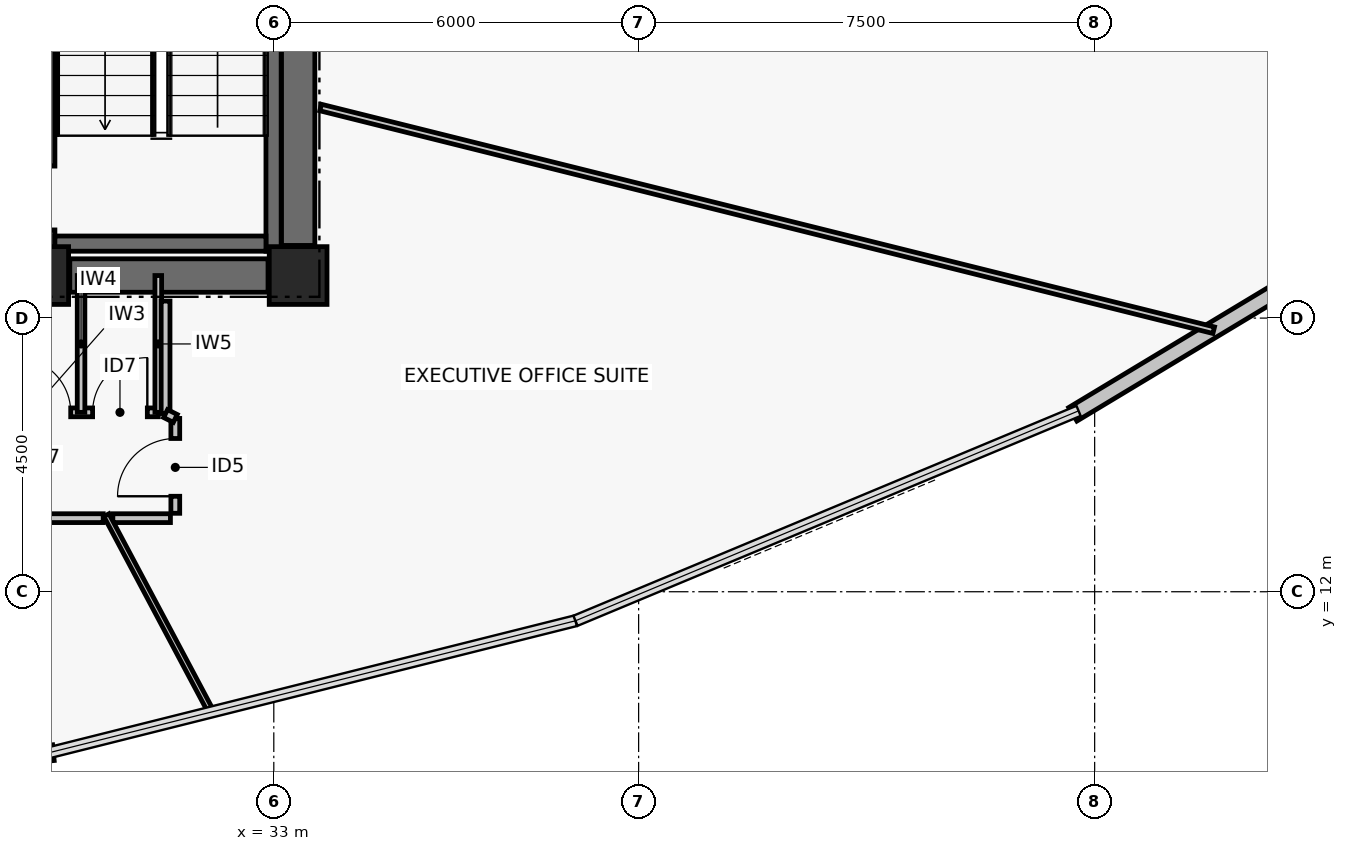
"""IFC4 building model, lengths in metres.
Left out: names, types, materials, properties, quantities, classifications, styles, units other than length and angle.
Written with IfcOpenShell. Run it as: python <this file> out.ifc"""

import sys

from ifc_helpers import new_model, si_unit, direction, frame, frame_2d, origin, origin_2d, place, context, subcontext, project, spatial, rectangle, extrude, element, fill, save


model = new_model("IFC4")
c1 = context("Model", 3, precision=1e-05, world=origin(), true_north=direction((0.0, 1.0)))
c2 = subcontext(c1, "Body", "Model", "MODEL_VIEW")
j1 = project(units=[si_unit("LENGTHUNIT", "METRE"), si_unit("PLANEANGLEUNIT", "RADIAN")], contexts=[c1])
p1 = place(None, origin())
s1 = spatial("IfcSite", under=j1, at=p1, CompositionType="ELEMENT")
p2 = place(p1, origin())
s2 = spatial("IfcBuilding", under=s1, at=p2, CompositionType="ELEMENT")
p3 = place(p2, frame((0.0, 0.0, 165.48)))
s3 = spatial("IfcBuildingStorey", under=s2, at=p3, CompositionType="ELEMENT", Elevation=165.48)
for number, where, z_axis, x_axis in (
    (1, (29.15, 17.2, 0.0), (0.0, 0.0, 1.0), (1.0, 0.0, 0.0)),
    (2, (33.4, 17.2, 0.0), (0.0, 0.0, 1.0), (1.0, 0.0, 0.0)),
):
    element("IfcColumn", number, at=place(p3, frame(where, z_axis=z_axis, x_axis=x_axis)), inside=s3, PredefinedType="COLUMN", context=c2, shape_type="SweptSolid", body=[
        extrude(rectangle(XDim=0.95, YDim=0.95, at=origin_2d()), origin(), (0.0, 0.0, 1.0), 3.72),
    ])
p4 = place(p3, frame((29.645, 17.2, 0.0), z_axis=(0.0, 0.0, 1.0), x_axis=(1.0, 0.0, 0.0)))
e3 = element("IfcWall", 3, at=p4, inside=s3, PredefinedType="SHEAR", context=c2, shape_type="SweptSolid", body=[
    extrude(rectangle(XDim=3.26, YDim=0.55, at=frame_2d((1.63, 0.0))), origin(), (0.0, 0.0, 1.0), 3.5),
])
p5 = place(p3, frame((33.4, 17.695, 0.0), z_axis=(0.0, 0.0, 1.0), x_axis=(0.0, 1.0, 0.0)))
e4 = element("IfcWall", 4, at=p5, inside=s3, PredefinedType="SHEAR", context=c2, shape_type="SweptSolid", body=[
    extrude(rectangle(XDim=8.61, YDim=0.55, at=frame_2d((4.305, 0.0))), origin(), (0.0, 0.0, 1.0), 3.5),
])
p6 = place(p3, frame((29.275, 17.6, 0.0), z_axis=(0.0, 0.0, 1.0), x_axis=(0.0, 1.0, 0.0)))
e5 = element("IfcWall", 5, at=p6, inside=s3, PredefinedType="SHEAR", context=c2, shape_type="SweptSolid", body=[
    extrude(rectangle(XDim=8.8, YDim=0.25, at=frame_2d((4.4, 0.0))), origin(), (0.0, 0.0, 1.0), 3.5),
])
p7 = place(p6, frame((0.35, 0.0, 0.0)))
e6 = element("IfcOpeningElement", 6, at=p7, cuts=e5, PredefinedType="OPENING", context=c2, shape_type="SweptSolid", body=[
    extrude(rectangle(XDim=1.05, YDim=2.08, at=frame_2d((0.525, 1.04))), frame((0.0, 0.135, 0.0), z_axis=(0.0, -1.0, 0.0), x_axis=(1.0, 0.0, 0.0)), (0.0, 0.0, 1.0), 0.27),
])
p8 = place(p3, frame((32.996, 17.6, 0.0), z_axis=(0.0, 0.0, 1.0), x_axis=(0.0, 1.0, 0.0)))
e7 = element("IfcWall", 7, at=p8, inside=s3, PredefinedType="SHEAR", context=c2, shape_type="SweptSolid", body=[
    extrude(rectangle(XDim=8.8, YDim=0.25, at=frame_2d((4.4, 0.0))), origin(), (0.0, 0.0, 1.0), 3.5),
])
p9 = place(p3, frame((29.4, 17.725, 0.0), z_axis=(0.0, 0.0, 1.0), x_axis=(1.0, 0.0, 0.0)))
e8 = element("IfcWall", 8, at=p9, inside=s3, PredefinedType="SHEAR", context=c2, shape_type="SweptSolid", body=[
    extrude(rectangle(XDim=3.471, YDim=0.25, at=frame_2d((1.736, 0.0))), origin(), (0.0, 0.0, 1.0), 3.5),
])
p10 = place(p3, frame((29.375, 9.354, 0.0), z_axis=(0.0, 0.0, 1.0), x_axis=(-0.9950896707, -0.098977508888, 0.0)))
e9 = element("IfcWall", 9, at=p10, inside=s3, PredefinedType="PARTITIONING", context=c2, shape_type="SweptSolid", body=[
    extrude(rectangle(XDim=9.28, YDim=0.26, at=frame_2d((4.64, 0.0))), origin(), (0.0, 0.0, 1.0), 3.5),
])
p11 = place(p3, frame((54.091, 19.703, 0.0), z_axis=(0.0, 0.0, 1.0), x_axis=(-0.856788694159, -0.515667658053, 0.0)))
e10 = element("IfcWall", 10, at=p11, inside=s3, PredefinedType="PARTITIONING", context=c2, shape_type="SweptSolid", body=[
    extrude(rectangle(XDim=9.279, YDim=0.26, at=frame_2d((4.64, 0.0))), origin(), (0.0, 0.0, 1.0), 3.5),
])
p12 = place(p3, frame((26.88, 14.95, 0.0), z_axis=(0.0, 0.0, 1.0), x_axis=(1.0, 0.0, 0.0)))
e11 = element("IfcWall", 11, at=p12, inside=s3, PredefinedType="PARTITIONING", context=c2, shape_type="SweptSolid", body=[
    extrude(rectangle(XDim=4.22, YDim=0.145, at=frame_2d((2.11, 0.0))), origin(), (0.0, 0.0, 1.0), 2.93),
])
p13 = place(p12, frame((0.39, 0.0, 0.0)))
e12 = element("IfcOpeningElement", 12, at=p13, cuts=e11, PredefinedType="OPENING", context=c2, shape_type="SweptSolid", body=[
    extrude(rectangle(XDim=0.92, YDim=2.05, at=frame_2d((0.46, 1.025))), frame((0.0, 0.083, 0.0), z_axis=(0.0, -1.0, 0.0), x_axis=(1.0, 0.0, 0.0)), (0.0, 0.0, 1.0), 0.165),
])
p14 = place(p12, frame((1.88, 0.0, 0.0)))
e13 = element("IfcOpeningElement", 13, at=p14, cuts=e11, PredefinedType="OPENING", context=c2, shape_type="SweptSolid", body=[
    extrude(rectangle(XDim=0.9, YDim=2.02, at=frame_2d((0.45, 1.01))), frame((0.0, 0.083, 0.0), z_axis=(0.0, -1.0, 0.0), x_axis=(1.0, 0.0, 0.0)), (0.0, 0.0, 1.0), 0.165),
])
p15 = place(p12, frame((3.14, 0.0, 0.0)))
e14 = element("IfcOpeningElement", 14, at=p15, cuts=e11, PredefinedType="OPENING", context=c2, shape_type="SweptSolid", body=[
    extrude(rectangle(XDim=0.9, YDim=2.02, at=frame_2d((0.45, 1.01))), frame((0.0, 0.083, 0.0), z_axis=(0.0, -1.0, 0.0), x_axis=(1.0, 0.0, 0.0)), (0.0, 0.0, 1.0), 0.165),
])
p16 = place(p3, frame((29.83, 14.95, 0.0), z_axis=(0.0, 0.0, 1.0), x_axis=(0.0, 1.0, 0.0)))
e15 = element("IfcWall", 15, at=p16, inside=s3, PredefinedType="PARTITIONING", context=c2, shape_type="SweptSolid", body=[
    extrude(rectangle(XDim=2.25, YDim=0.125, at=frame_2d((1.125, 0.0))), origin(), (0.0, 0.0, 1.0), 2.63),
])
p17 = place(p3, frame((31.1, 14.95, 0.0), z_axis=(0.0, 0.0, 1.0), x_axis=(0.0, 1.0, 0.0)))
e16 = element("IfcWall", 16, at=p17, inside=s3, PredefinedType="PARTITIONING", context=c2, shape_type="SweptSolid", body=[
    extrude(rectangle(XDim=2.25, YDim=0.11, at=frame_2d((1.125, 0.0))), origin(), (0.0, 0.0, 1.0), 2.63),
])
p18 = place(p3, frame((21.006, 13.21, 0.0), z_axis=(0.0, 0.0, 1.0), x_axis=(1.0, 0.0, 0.0)))
e17 = element("IfcWall", 17, at=p18, inside=s3, PredefinedType="PARTITIONING", context=c2, shape_type="SweptSolid", body=[
    extrude(rectangle(XDim=9.189, YDim=0.145, at=frame_2d((4.594, 0.0))), origin(), (0.0, 0.0, 1.0), 2.73),
])
p19 = place(p18, frame((5.098, 0.0, 0.0)))
e18 = element("IfcOpeningElement", 18, at=p19, cuts=e17, PredefinedType="OPENING", context=c2, shape_type="SweptSolid", body=[
    extrude(rectangle(XDim=0.92, YDim=2.05, at=frame_2d((0.46, 1.025))), frame((0.0, 0.083, 0.0), z_axis=(0.0, -1.0, 0.0), x_axis=(1.0, 0.0, 0.0)), (0.0, 0.0, 1.0), 0.165),
])
p20 = place(p3, frame((30.353, 13.21, 0.0), z_axis=(0.0, 0.0, 1.0), x_axis=(1.0, 0.0, 0.0)))
e19 = element("IfcWall", 19, at=p20, inside=s3, PredefinedType="PARTITIONING", context=c2, shape_type="SweptSolid", body=[
    extrude(rectangle(XDim=0.947, YDim=0.145, at=frame_2d((0.474, 0.0))), origin(), (0.0, 0.0, 1.0), 3.5),
])
p21 = place(p3, frame((31.38, 13.29, 0.0), z_axis=(0.0, 0.0, 1.0), x_axis=(0.0, 1.0, 0.0)))
e20 = element("IfcWall", 20, at=p21, inside=s3, PredefinedType="PARTITIONING", context=c2, shape_type="SweptSolid", body=[
    extrude(rectangle(XDim=1.56, YDim=0.145, at=frame_2d((0.78, 0.0))), origin(), (0.0, 0.0, 1.0), 3.5),
])
p22 = place(p21, frame((0.28, 0.0, 0.0)))
e21 = element("IfcOpeningElement", 21, at=p22, cuts=e20, PredefinedType="OPENING", context=c2, shape_type="SweptSolid", body=[
    extrude(rectangle(XDim=0.95, YDim=2.06, at=frame_2d((0.475, 1.03))), frame((0.0, 0.083, 0.0), z_axis=(0.0, -1.0, 0.0), x_axis=(1.0, 0.0, 0.0)), (0.0, 0.0, 1.0), 0.165),
])
p23 = place(p3, frame((31.22, 14.93, 0.0), z_axis=(0.0, 0.0, 1.0), x_axis=(0.0, 1.0, 0.0)))
e22 = element("IfcWall", 22, at=p23, inside=s3, PredefinedType="PARTITIONING", context=c2, shape_type="SweptSolid", body=[
    extrude(rectangle(XDim=1.85, YDim=0.145, at=frame_2d((0.925, 0.0))), origin(), (0.0, 0.0, 1.0), 2.63),
])
p24 = place(p3, frame((30.247, 13.26, 0.0), z_axis=(0.0, 0.0, 1.0), x_axis=(0.469475406562, -0.882945549076, 0.0)))
e23 = element("IfcWall", 23, at=p24, inside=s3, PredefinedType="PARTITIONING", context=c2, shape_type="SweptSolid", body=[
    extrude(rectangle(XDim=3.679, YDim=0.095, at=frame_2d((1.84, 0.0))), origin(), (0.0, 0.0, 1.0), 3.5),
])
p25 = place(p3, frame((33.77, 19.963, 0.0), z_axis=(0.0, 0.0, 1.0), x_axis=(0.970295996232, -0.241920812863, 0.0)))
e24 = element("IfcWall", 24, at=p25, inside=s3, PredefinedType="PARTITIONING", context=c2, shape_type="SweptSolid", body=[
    extrude(rectangle(XDim=15.138, YDim=0.11, at=frame_2d((7.569, 0.0))), origin(), (0.0, 0.0, 1.0), 2.63),
])
p26 = place(p3, frame((31.38, 14.85, 0.0), z_axis=(0.0, 0.0, 1.0), x_axis=(-0.89470021502, 0.446667130247, 0.0)))
e25 = element("IfcWall", 25, at=p26, inside=s3, PredefinedType="PARTITIONING", context=c2, shape_type="SweptSolid", body=[
    extrude(rectangle(XDim=0.179, YDim=0.145, at=frame_2d((0.089, 0.0))), origin(), (0.0, 0.0, 1.0), 3.5),
])
p27 = place(p14, origin())
e26 = element("IfcDoor", 26, at=p27, inside=s3, OperationType="SINGLE_SWING_LEFT", PredefinedType="DOOR", context=c2, shape_type="SweptSolid", body=[
    extrude(rectangle(XDim=0.9, YDim=2.02, at=frame_2d((0.45, 1.01))), frame((0.0, 0.025, 0.0), z_axis=(0.0, -1.0, 0.0), x_axis=(1.0, 0.0, 0.0)), (0.0, 0.0, 1.0), 0.05),
])
fill(e13, e26)
p28 = place(p15, origin())
e27 = element("IfcDoor", 27, at=p28, inside=s3, OperationType="SINGLE_SWING_RIGHT", PredefinedType="DOOR", context=c2, shape_type="SweptSolid", body=[
    extrude(rectangle(XDim=0.9, YDim=2.02, at=frame_2d((0.45, 1.01))), frame((0.0, 0.025, 0.0), z_axis=(0.0, -1.0, 0.0), x_axis=(1.0, 0.0, 0.0)), (0.0, 0.0, 1.0), 0.05),
])
fill(e14, e27)
p29 = place(p22, origin())
e28 = element("IfcDoor", 28, at=p29, inside=s3, OperationType="SINGLE_SWING_LEFT", PredefinedType="DOOR", context=c2, shape_type="SweptSolid", body=[
    extrude(rectangle(XDim=0.95, YDim=2.06, at=frame_2d((0.475, 1.03))), frame((0.0, 0.025, 0.0), z_axis=(0.0, -1.0, 0.0), x_axis=(1.0, 0.0, 0.0)), (0.0, 0.0, 1.0), 0.05),
])
fill(e21, e28)
save(model, sys.argv[1])
